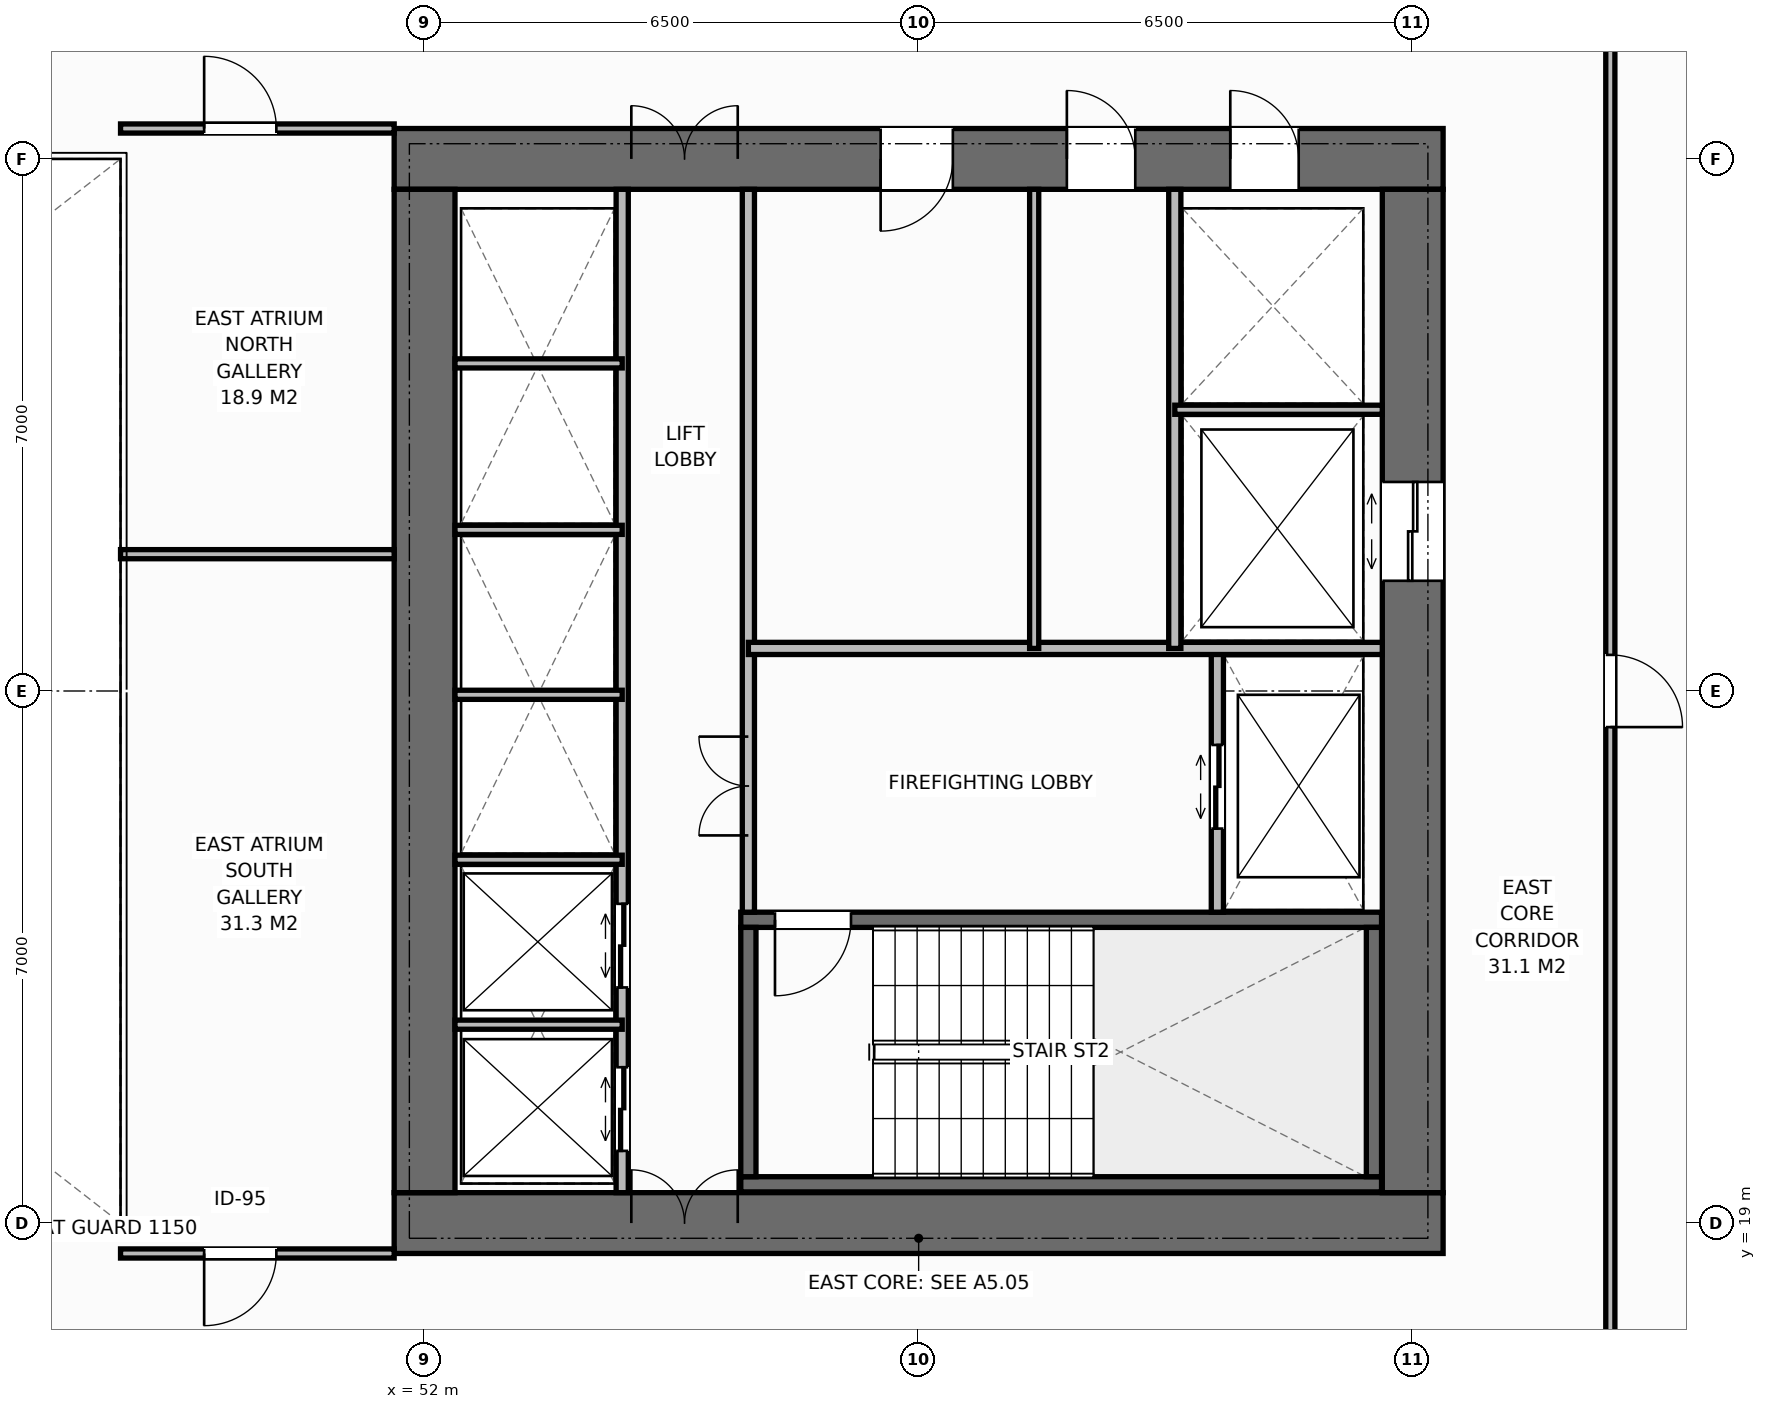
"""IFC4 building model, lengths in metres.
Left out: names, types, materials, properties, quantities, classifications, styles, units other than length and angle.
Written with IfcOpenShell. Run it as: python <this file> out.ifc"""

import sys

from ifc_helpers import new_model, si_unit, direction, frame, frame_2d, origin, place, context, subcontext, project, spatial, rectangle, extrude, element, fill, save


model = new_model("IFC4")
c1 = context("Model", 3, precision=1e-05, world=origin(), true_north=direction((0.0, 1.0)))
c2 = subcontext(c1, "Body", "Model", "MODEL_VIEW")
j1 = project(units=[si_unit("LENGTHUNIT", "METRE"), si_unit("PLANEANGLEUNIT", "RADIAN")], contexts=[c1])
p1 = place(None, origin())
s1 = spatial("IfcSite", under=j1, at=p1, CompositionType="ELEMENT")
p2 = place(p1, origin())
s2 = spatial("IfcBuilding", under=s1, at=p2, CompositionType="ELEMENT")
p3 = place(p2, frame((0.0, 0.0, 54.4)))
s3 = spatial("IfcBuildingStorey", under=s2, at=p3, CompositionType="ELEMENT", Elevation=54.4)
p4 = place(p3, frame((51.6, 19.0, 0.0), z_axis=(0.0, 0.0, 1.0), x_axis=(1.0, 0.0, 0.0)))
e1 = element("IfcWall", 1, at=p4, inside=s3, PredefinedType="SHEAR", context=c2, shape_type="SweptSolid", body=[
    extrude(rectangle(XDim=13.8, YDim=0.8, at=frame_2d((6.9, 0.0))), origin(), (0.0, 0.0, 1.0), 3.8),
])
p5 = place(p4, frame((3.12, 0.0, 0.0)))
e2 = element("IfcOpeningElement", 2, at=p5, cuts=e1, PredefinedType="OPENING", context=c2, shape_type="SweptSolid", body=[
    extrude(rectangle(XDim=1.4, YDim=2.2, at=frame_2d((0.7, 1.1))), frame((0.0, 0.41, 0.0), z_axis=(0.0, -1.0, 0.0), x_axis=(1.0, 0.0, 0.0)), (0.0, 0.0, 1.0), 0.82),
])
p6 = place(p3, frame((51.6, 33.0, 0.0), z_axis=(0.0, 0.0, 1.0), x_axis=(1.0, 0.0, 0.0)))
e3 = element("IfcWall", 3, at=p6, inside=s3, PredefinedType="SHEAR", context=c2, shape_type="SweptSolid", body=[
    extrude(rectangle(XDim=13.8, YDim=0.8, at=frame_2d((6.9, 0.0))), origin(), (0.0, 0.0, 1.0), 3.8),
])
p7 = place(p6, frame((3.12, 0.0, 0.0)))
e4 = element("IfcOpeningElement", 4, at=p7, cuts=e3, PredefinedType="OPENING", context=c2, shape_type="SweptSolid", body=[
    extrude(rectangle(XDim=1.4, YDim=2.2, at=frame_2d((0.7, 1.1))), frame((0.0, 0.41, 0.0), z_axis=(0.0, -1.0, 0.0), x_axis=(1.0, 0.0, 0.0)), (0.0, 0.0, 1.0), 0.82),
])
p8 = place(p6, frame((11.0, 0.0, 0.0)))
e5 = element("IfcOpeningElement", 5, at=p8, cuts=e3, PredefinedType="OPENING", context=c2, shape_type="SweptSolid", body=[
    extrude(rectangle(XDim=0.9, YDim=2.15, at=frame_2d((0.45, 1.075))), frame((0.0, 0.41, 0.0), z_axis=(0.0, -1.0, 0.0), x_axis=(1.0, 0.0, 0.0)), (0.0, 0.0, 1.0), 0.82),
])
p9 = place(p6, frame((6.4, 0.0, 0.0)))
e6 = element("IfcOpeningElement", 6, at=p9, cuts=e3, PredefinedType="OPENING", context=c2, shape_type="SweptSolid", body=[
    extrude(rectangle(XDim=0.95, YDim=2.15, at=frame_2d((0.475, 1.075))), frame((0.0, 0.41, 0.0), z_axis=(0.0, -1.0, 0.0), x_axis=(1.0, 0.0, 0.0)), (0.0, 0.0, 1.0), 0.82),
])
p10 = place(p6, frame((8.85, 0.0, 0.0)))
e7 = element("IfcOpeningElement", 7, at=p10, cuts=e3, PredefinedType="OPENING", context=c2, shape_type="SweptSolid", body=[
    extrude(rectangle(XDim=0.9, YDim=2.15, at=frame_2d((0.45, 1.075))), frame((0.0, 0.41, 0.0), z_axis=(0.0, -1.0, 0.0), x_axis=(1.0, 0.0, 0.0)), (0.0, 0.0, 1.0), 0.82),
])
p11 = place(p3, frame((52.0, 19.4, 0.0), z_axis=(0.0, 0.0, 1.0), x_axis=(0.0, 1.0, 0.0)))
e8 = element("IfcWall", 8, at=p11, inside=s3, PredefinedType="SHEAR", context=c2, shape_type="SweptSolid", body=[
    extrude(rectangle(XDim=13.2, YDim=0.8, at=frame_2d((6.6, 0.0))), origin(), (0.0, 0.0, 1.0), 3.8),
])
p12 = place(p3, frame((65.0, 19.4, 0.0), z_axis=(0.0, 0.0, 1.0), x_axis=(0.0, 1.0, 0.0)))
e9 = element("IfcWall", 9, at=p12, inside=s3, PredefinedType="SHEAR", context=c2, shape_type="SweptSolid", body=[
    extrude(rectangle(XDim=13.2, YDim=0.8, at=frame_2d((6.6, 0.0))), origin(), (0.0, 0.0, 1.0), 3.8),
])
p13 = place(p12, frame((8.05, 0.0, 0.0)))
e10 = element("IfcOpeningElement", 10, at=p13, cuts=e9, PredefinedType="OPENING", context=c2, shape_type="SweptSolid", body=[
    extrude(rectangle(XDim=1.3, YDim=2.2, at=frame_2d((0.65, 1.1))), frame((0.0, 0.41, 0.0), z_axis=(0.0, -1.0, 0.0), x_axis=(1.0, 0.0, 0.0)), (0.0, 0.0, 1.0), 0.82),
])
p14 = place(p3, frame((56.16, 19.51, 0.0), z_axis=(0.0, 0.0, 1.0), x_axis=(1.0, 0.0, 0.0)))
e11 = element("IfcWall", 11, at=p14, inside=s3, PredefinedType="SHEAR", context=c2, shape_type="SweptSolid", body=[
    extrude(rectangle(XDim=8.43, YDim=0.2, at=frame_2d((4.215, 0.0))), origin(), (0.0, 0.0, 1.0), 3.8),
])
p15 = place(p3, frame((56.16, 22.99, 0.0), z_axis=(0.0, 0.0, 1.0), x_axis=(1.0, 0.0, 0.0)))
e12 = element("IfcWall", 12, at=p15, inside=s3, PredefinedType="SHEAR", context=c2, shape_type="SweptSolid", body=[
    extrude(rectangle(XDim=8.43, YDim=0.2, at=frame_2d((4.215, 0.0))), origin(), (0.0, 0.0, 1.0), 3.8),
])
p16 = place(p15, frame((0.45, 0.0, 0.0)))
e13 = element("IfcOpeningElement", 13, at=p16, cuts=e12, PredefinedType="OPENING", context=c2, shape_type="SweptSolid", body=[
    extrude(rectangle(XDim=1.0, YDim=2.15, at=frame_2d((0.5, 1.075))), frame((0.0, 0.11, 0.0), z_axis=(0.0, -1.0, 0.0), x_axis=(1.0, 0.0, 0.0)), (0.0, 0.0, 1.0), 0.22),
])
for number, where, z_axis, x_axis in (
    (14, (56.26, 19.61, 0.0), (0.0, 0.0, 1.0), (0.0, 1.0, 0.0)),
    (15, (64.49, 19.61, 0.0), (0.0, 0.0, 1.0), (0.0, 1.0, 0.0)),
):
    element("IfcWall", number, at=place(p3, frame(where, z_axis=z_axis, x_axis=x_axis)), inside=s3, PredefinedType="SHEAR", context=c2, shape_type="SweptSolid", body=[
        extrude(rectangle(XDim=3.28, YDim=0.2, at=frame_2d((1.64, 0.0))), origin(), (0.0, 0.0, 1.0), 3.8),
    ])
p17 = place(p3, frame((54.6, 19.4, 0.0), z_axis=(0.0, 0.0, 1.0), x_axis=(0.0, 1.0, 0.0)))
e16 = element("IfcWall", 16, at=p17, inside=s3, PredefinedType="STANDARD", context=c2, shape_type="SweptSolid", body=[
    extrude(rectangle(XDim=13.2, YDim=0.16, at=frame_2d((6.6, 0.0))), origin(), (0.0, 0.0, 1.0), 3.55),
])
p18 = place(p17, frame((0.55, 0.0, 0.0)))
e17 = element("IfcOpeningElement", 17, at=p18, cuts=e16, PredefinedType="OPENING", context=c2, shape_type="SweptSolid", body=[
    extrude(rectangle(XDim=1.1, YDim=2.2, at=frame_2d((0.55, 1.1))), frame((0.0, 0.09, 0.0), z_axis=(0.0, -1.0, 0.0), x_axis=(1.0, 0.0, 0.0)), (0.0, 0.0, 1.0), 0.18),
])
p19 = place(p17, frame((2.7, 0.0, 0.0)))
e18 = element("IfcOpeningElement", 18, at=p19, cuts=e16, PredefinedType="OPENING", context=c2, shape_type="SweptSolid", body=[
    extrude(rectangle(XDim=1.1, YDim=2.2, at=frame_2d((0.55, 1.1))), frame((0.0, 0.09, 0.0), z_axis=(0.0, -1.0, 0.0), x_axis=(1.0, 0.0, 0.0)), (0.0, 0.0, 1.0), 0.18),
])
p20 = place(p3, frame((56.26, 23.09, 0.0), z_axis=(0.0, 0.0, 1.0), x_axis=(0.0, 1.0, 0.0)))
e19 = element("IfcWall", 19, at=p20, inside=s3, PredefinedType="STANDARD", context=c2, shape_type="SweptSolid", body=[
    extrude(rectangle(XDim=9.51, YDim=0.16, at=frame_2d((4.755, 0.0))), origin(), (0.0, 0.0, 1.0), 3.55),
])
p21 = place(p20, frame((1.01, 0.0, 0.0)))
e20 = element("IfcOpeningElement", 20, at=p21, cuts=e19, PredefinedType="OPENING", context=c2, shape_type="SweptSolid", body=[
    extrude(rectangle(XDim=1.3, YDim=2.2, at=frame_2d((0.65, 1.1))), frame((0.0, 0.09, 0.0), z_axis=(0.0, -1.0, 0.0), x_axis=(1.0, 0.0, 0.0)), (0.0, 0.0, 1.0), 0.18),
])
for number, where, z_axis, x_axis in (
    (21, (52.4, 21.61, 0.0), (0.0, 0.0, 1.0), (1.0, 0.0, 0.0)),
    (22, (52.4, 23.78, 0.0), (0.0, 0.0, 1.0), (1.0, 0.0, 0.0)),
    (23, (52.4, 25.95, 0.0), (0.0, 0.0, 1.0), (1.0, 0.0, 0.0)),
    (24, (52.4, 28.12, 0.0), (0.0, 0.0, 1.0), (1.0, 0.0, 0.0)),
    (25, (52.4, 30.31, 0.0), (0.0, 0.0, 1.0), (1.0, 0.0, 0.0)),
):
    element("IfcWall", number, at=place(p3, frame(where, z_axis=z_axis, x_axis=x_axis)), inside=s3, PredefinedType="PARTITIONING", context=c2, shape_type="SweptSolid", body=[
        extrude(rectangle(XDim=2.2, YDim=0.12, at=frame_2d((1.1, 0.0))), origin(), (0.0, 0.0, 1.0), 3.55),
    ])
p22 = place(p3, frame((62.43, 23.09, 0.0), z_axis=(0.0, 0.0, 1.0), x_axis=(0.0, 1.0, 0.0)))
e26 = element("IfcWall", 26, at=p22, inside=s3, PredefinedType="STANDARD", context=c2, shape_type="SweptSolid", body=[
    extrude(rectangle(XDim=3.47, YDim=0.16, at=frame_2d((1.735, 0.0))), origin(), (0.0, 0.0, 1.0), 3.55),
])
p23 = place(p22, frame((1.1, 0.0, 0.0)))
e27 = element("IfcOpeningElement", 27, at=p23, cuts=e26, PredefinedType="OPENING", context=c2, shape_type="SweptSolid", body=[
    extrude(rectangle(XDim=1.1, YDim=2.2, at=frame_2d((0.55, 1.1))), frame((0.0, 0.09, 0.0), z_axis=(0.0, -1.0, 0.0), x_axis=(1.0, 0.0, 0.0)), (0.0, 0.0, 1.0), 0.18),
])
p24 = place(p3, frame((56.26, 26.56, 0.0), z_axis=(0.0, 0.0, 1.0), x_axis=(1.0, 0.0, 0.0)))
e28 = element("IfcWall", 28, at=p24, inside=s3, PredefinedType="STANDARD", context=c2, shape_type="SweptSolid", body=[
    extrude(rectangle(XDim=8.34, YDim=0.16, at=frame_2d((4.17, 0.0))), origin(), (0.0, 0.0, 1.0), 3.55),
])
p25 = place(p3, frame((61.87, 26.56, 0.0), z_axis=(0.0, 0.0, 1.0), x_axis=(0.0, 1.0, 0.0)))
e29 = element("IfcWall", 29, at=p25, inside=s3, PredefinedType="STANDARD", context=c2, shape_type="SweptSolid", body=[
    extrude(rectangle(XDim=6.04, YDim=0.16, at=frame_2d((3.02, 0.0))), origin(), (0.0, 0.0, 1.0), 3.55),
])
p26 = place(p3, frame((61.87, 29.7, 0.0), z_axis=(0.0, 0.0, 1.0), x_axis=(1.0, 0.0, 0.0)))
e30 = element("IfcWall", 30, at=p26, inside=s3, PredefinedType="PARTITIONING", context=c2, shape_type="SweptSolid", body=[
    extrude(rectangle(XDim=2.73, YDim=0.12, at=frame_2d((1.365, 0.0))), origin(), (0.0, 0.0, 1.0), 3.55),
])
p27 = place(p3, frame((60.02, 26.56, 0.0), z_axis=(0.0, 0.0, 1.0), x_axis=(0.0, 1.0, 0.0)))
e31 = element("IfcWall", 31, at=p27, inside=s3, PredefinedType="PARTITIONING", context=c2, shape_type="SweptSolid", body=[
    extrude(rectangle(XDim=6.04, YDim=0.12, at=frame_2d((3.02, 0.0))), origin(), (0.0, 0.0, 1.0), 3.55),
])
p28 = place(p3, frame((48.0, 27.8, 0.0), z_axis=(0.0, 0.0, 1.0), x_axis=(1.0, 0.0, 0.0)))
e32 = element("IfcWall", 32, at=p28, inside=s3, PredefinedType="PARTITIONING", context=c2, shape_type="SweptSolid", body=[
    extrude(rectangle(XDim=3.6, YDim=0.12, at=frame_2d((1.8, 0.0))), origin(), (0.0, 0.0, 1.0), 3.55),
])
p29 = place(p3, frame((48.0, 18.6, 0.0), z_axis=(0.0, 0.0, 1.0), x_axis=(1.0, 0.0, 0.0)))
e33 = element("IfcWall", 33, at=p29, inside=s3, PredefinedType="PARTITIONING", context=c2, shape_type="SweptSolid", body=[
    extrude(rectangle(XDim=3.6, YDim=0.12, at=frame_2d((1.8, 0.0))), origin(), (0.0, 0.0, 1.0), 3.55),
])
p30 = place(p29, frame((1.1, 0.0, 0.0)))
e34 = element("IfcOpeningElement", 34, at=p30, cuts=e33, PredefinedType="OPENING", context=c2, shape_type="SweptSolid", body=[
    extrude(rectangle(XDim=0.95, YDim=2.15, at=frame_2d((0.475, 1.075))), frame((0.0, 0.07, 0.0), z_axis=(0.0, -1.0, 0.0), x_axis=(1.0, 0.0, 0.0)), (0.0, 0.0, 1.0), 0.14),
])
p31 = place(p3, frame((48.0, 33.4, 0.0), z_axis=(0.0, 0.0, 1.0), x_axis=(1.0, 0.0, 0.0)))
e35 = element("IfcWall", 35, at=p31, inside=s3, PredefinedType="PARTITIONING", context=c2, shape_type="SweptSolid", body=[
    extrude(rectangle(XDim=3.6, YDim=0.12, at=frame_2d((1.8, 0.0))), origin(), (0.0, 0.0, 1.0), 3.55),
])
p32 = place(p31, frame((1.1, 0.0, 0.0)))
e36 = element("IfcOpeningElement", 36, at=p32, cuts=e35, PredefinedType="OPENING", context=c2, shape_type="SweptSolid", body=[
    extrude(rectangle(XDim=0.95, YDim=2.15, at=frame_2d((0.475, 1.075))), frame((0.0, 0.07, 0.0), z_axis=(0.0, -1.0, 0.0), x_axis=(1.0, 0.0, 0.0)), (0.0, 0.0, 1.0), 0.14),
])
p33 = place(p3, frame((67.6, 16.5, 0.0), z_axis=(0.0, 0.0, 1.0), x_axis=(0.0, 1.0, 0.0)))
e37 = element("IfcWall", 37, at=p33, inside=s3, PredefinedType="PARTITIONING", context=c2, shape_type="SweptSolid", body=[
    extrude(rectangle(XDim=19.0, YDim=0.12, at=frame_2d((9.5, 0.0))), origin(), (0.0, 0.0, 1.0), 3.55),
])
p34 = place(p33, frame((9.025, 0.0, 0.0)))
e38 = element("IfcOpeningElement", 38, at=p34, cuts=e37, PredefinedType="OPENING", context=c2, shape_type="SweptSolid", body=[
    extrude(rectangle(XDim=0.95, YDim=2.15, at=frame_2d((0.475, 1.075))), frame((0.0, 0.07, 0.0), z_axis=(0.0, -1.0, 0.0), x_axis=(1.0, 0.0, 0.0)), (0.0, 0.0, 1.0), 0.14),
])
p35 = place(p5, origin())
e39 = element("IfcDoor", 39, at=p35, inside=s3, OperationType="DOUBLE_DOOR_SINGLE_SWING", PredefinedType="DOOR", context=c2, shape_type="SweptSolid", body=[
    extrude(rectangle(XDim=1.4, YDim=2.2, at=frame_2d((0.7, 1.1))), frame((0.0, 0.125, 0.0), z_axis=(0.0, -1.0, 0.0), x_axis=(1.0, 0.0, 0.0)), (0.0, 0.0, 1.0), 0.05),
])
fill(e2, e39)
p36 = place(p7, origin())
e40 = element("IfcDoor", 40, at=p36, inside=s3, OperationType="DOUBLE_DOOR_SINGLE_SWING", PredefinedType="DOOR", context=c2, shape_type="SweptSolid", body=[
    extrude(rectangle(XDim=1.4, YDim=2.2, at=frame_2d((0.7, 1.1))), frame((0.0, -0.075, 0.0), z_axis=(0.0, -1.0, 0.0), x_axis=(1.0, 0.0, 0.0)), (0.0, 0.0, 1.0), 0.05),
])
fill(e4, e40)
p37 = place(p18, origin())
e41 = element("IfcDoor", 41, at=p37, inside=s3, OperationType="DOUBLE_DOOR_SLIDING", PredefinedType="DOOR", context=c2, shape_type="SweptSolid", body=[
    extrude(rectangle(XDim=1.1, YDim=2.2, at=frame_2d((0.55, 1.1))), frame((0.0, 0.025, 0.0), z_axis=(0.0, -1.0, 0.0), x_axis=(1.0, 0.0, 0.0)), (0.0, 0.0, 1.0), 0.05),
])
fill(e17, e41)
p38 = place(p19, origin())
e42 = element("IfcDoor", 42, at=p38, inside=s3, OperationType="DOUBLE_DOOR_SLIDING", PredefinedType="DOOR", context=c2, shape_type="SweptSolid", body=[
    extrude(rectangle(XDim=1.1, YDim=2.2, at=frame_2d((0.55, 1.1))), frame((0.0, 0.025, 0.0), z_axis=(0.0, -1.0, 0.0), x_axis=(1.0, 0.0, 0.0)), (0.0, 0.0, 1.0), 0.05),
])
fill(e18, e42)
p39 = place(p16, origin())
e43 = element("IfcDoor", 43, at=p39, inside=s3, OperationType="SINGLE_SWING_RIGHT", PredefinedType="DOOR", context=c2, shape_type="SweptSolid", body=[
    extrude(rectangle(XDim=1.0, YDim=2.15, at=frame_2d((0.5, 1.075))), frame((0.0, 0.025, 0.0), z_axis=(0.0, -1.0, 0.0), x_axis=(1.0, 0.0, 0.0)), (0.0, 0.0, 1.0), 0.05),
])
fill(e13, e43)
p40 = place(p23, origin())
e44 = element("IfcDoor", 44, at=p40, inside=s3, OperationType="DOUBLE_DOOR_SLIDING", PredefinedType="DOOR", context=c2, shape_type="SweptSolid", body=[
    extrude(rectangle(XDim=1.1, YDim=2.2, at=frame_2d((0.55, 1.1))), frame((0.0, 0.025, 0.0), z_axis=(0.0, -1.0, 0.0), x_axis=(1.0, 0.0, 0.0)), (0.0, 0.0, 1.0), 0.05),
])
fill(e27, e44)
p41 = place(p21, origin())
e45 = element("IfcDoor", 45, at=p41, inside=s3, OperationType="DOUBLE_DOOR_SINGLE_SWING", PredefinedType="DOOR", context=c2, shape_type="SweptSolid", body=[
    extrude(rectangle(XDim=1.3, YDim=2.2, at=frame_2d((0.65, 1.1))), frame((0.0, 0.025, 0.0), z_axis=(0.0, -1.0, 0.0), x_axis=(1.0, 0.0, 0.0)), (0.0, 0.0, 1.0), 0.05),
])
fill(e20, e45)
p42 = place(p13, origin())
e46 = element("IfcDoor", 46, at=p42, inside=s3, OperationType="DOUBLE_DOOR_SLIDING", PredefinedType="DOOR", context=c2, shape_type="SweptSolid", body=[
    extrude(rectangle(XDim=1.3, YDim=2.2, at=frame_2d((0.65, 1.1))), frame((0.0, 0.025, 0.0), z_axis=(0.0, -1.0, 0.0), x_axis=(1.0, 0.0, 0.0)), (0.0, 0.0, 1.0), 0.05),
])
fill(e10, e46)
p43 = place(p8, origin())
e47 = element("IfcDoor", 47, at=p43, inside=s3, OperationType="SINGLE_SWING_LEFT", PredefinedType="DOOR", context=c2, shape_type="SweptSolid", body=[
    extrude(rectangle(XDim=0.9, YDim=2.15, at=frame_2d((0.45, 1.075))), frame((0.0, -0.075, 0.0), z_axis=(0.0, -1.0, 0.0), x_axis=(1.0, 0.0, 0.0)), (0.0, 0.0, 1.0), 0.05),
])
fill(e5, e47)
p44 = place(p9, origin())
e48 = element("IfcDoor", 48, at=p44, inside=s3, OperationType="SINGLE_SWING_RIGHT", PredefinedType="DOOR", context=c2, shape_type="SweptSolid", body=[
    extrude(rectangle(XDim=0.95, YDim=2.15, at=frame_2d((0.475, 1.075))), frame((0.0, -0.075, 0.0), z_axis=(0.0, -1.0, 0.0), x_axis=(1.0, 0.0, 0.0)), (0.0, 0.0, 1.0), 0.05),
])
fill(e6, e48)
p45 = place(p10, origin())
e49 = element("IfcDoor", 49, at=p45, inside=s3, OperationType="SINGLE_SWING_LEFT", PredefinedType="DOOR", context=c2, shape_type="SweptSolid", body=[
    extrude(rectangle(XDim=0.9, YDim=2.15, at=frame_2d((0.45, 1.075))), frame((0.0, -0.075, 0.0), z_axis=(0.0, -1.0, 0.0), x_axis=(1.0, 0.0, 0.0)), (0.0, 0.0, 1.0), 0.05),
])
fill(e7, e49)
p46 = place(p30, origin())
e50 = element("IfcDoor", 50, at=p46, inside=s3, OperationType="SINGLE_SWING_RIGHT", PredefinedType="DOOR", context=c2, shape_type="SweptSolid", body=[
    extrude(rectangle(XDim=0.95, YDim=2.15, at=frame_2d((0.475, 1.075))), frame((0.0, 0.025, 0.0), z_axis=(0.0, -1.0, 0.0), x_axis=(1.0, 0.0, 0.0)), (0.0, 0.0, 1.0), 0.05),
])
fill(e34, e50)
p47 = place(p32, origin())
e51 = element("IfcDoor", 51, at=p47, inside=s3, OperationType="SINGLE_SWING_LEFT", PredefinedType="DOOR", context=c2, shape_type="SweptSolid", body=[
    extrude(rectangle(XDim=0.95, YDim=2.15, at=frame_2d((0.475, 1.075))), frame((0.0, 0.025, 0.0), z_axis=(0.0, -1.0, 0.0), x_axis=(1.0, 0.0, 0.0)), (0.0, 0.0, 1.0), 0.05),
])
fill(e36, e51)
p48 = place(p34, origin())
e52 = element("IfcDoor", 52, at=p48, inside=s3, OperationType="SINGLE_SWING_RIGHT", PredefinedType="DOOR", context=c2, shape_type="SweptSolid", body=[
    extrude(rectangle(XDim=0.95, YDim=2.15, at=frame_2d((0.475, 1.075))), frame((0.0, 0.025, 0.0), z_axis=(0.0, -1.0, 0.0), x_axis=(1.0, 0.0, 0.0)), (0.0, 0.0, 1.0), 0.05),
])
fill(e38, e52)
save(model, sys.argv[1])
